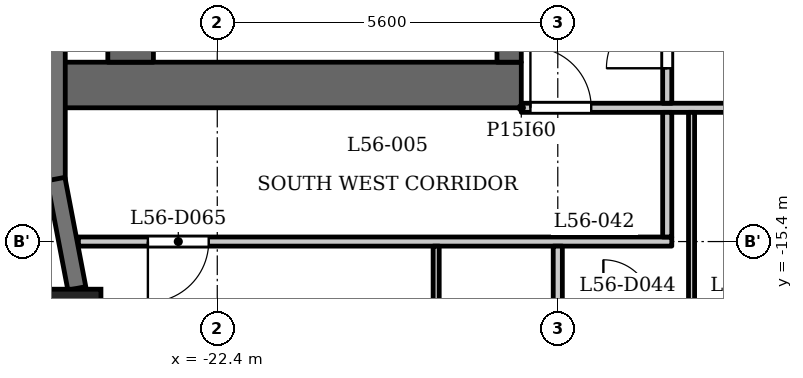
"""IFC4 building model, lengths in metres.
Left out: names, types, materials, properties, quantities, classifications, styles, units other than length and angle.
Written with IfcOpenShell. Run it as: python <this file> out.ifc"""

import sys

from ifc_helpers import new_model, si_unit, direction, frame, frame_2d, origin, origin_2d, place, context, subcontext, project, spatial, rectangle, extrude, element, fill, save


model = new_model("IFC4")
c1 = context("Model", 3, precision=1e-05, world=origin(), true_north=direction((0.0, 1.0)))
c2 = subcontext(c1, "Body", "Model", "MODEL_VIEW")
j1 = project(units=[si_unit("LENGTHUNIT", "METRE"), si_unit("PLANEANGLEUNIT", "RADIAN")], contexts=[c1])
p1 = place(None, origin())
s1 = spatial("IfcSite", under=j1, at=p1, CompositionType="ELEMENT")
p2 = place(p1, origin())
s2 = spatial("IfcBuilding", under=s1, at=p2, CompositionType="ELEMENT")
p3 = place(p2, frame((0.0, 0.0, 216.9)))
s3 = spatial("IfcBuildingStorey", under=s2, at=p3, CompositionType="ELEMENT", Elevation=216.9)
p4 = place(p3, frame((-24.738, -16.609, 0.0), z_axis=(0.0, 0.0, 1.0), x_axis=(1.0, 0.0, 0.0)))
e1 = element("IfcColumn", 1, at=p4, inside=s3, PredefinedType="COLUMN", context=c2, shape_type="SweptSolid", body=[
    extrude(rectangle(XDim=0.85, YDim=0.85, at=origin_2d()), origin(), (0.0, 0.0, 1.0), 3.5),
])
p5 = place(p3, frame((-25.05, -11.625, 0.0), z_axis=(0.0, 0.0, 1.0), x_axis=(0.0, -1.0, 0.0)))
e2 = element("IfcWall", 2, at=p5, inside=s3, PredefinedType="SOLIDWALL", context=c2, shape_type="SweptSolid", body=[
    extrude(rectangle(XDim=2.775, YDim=0.3, at=frame_2d((1.387, 0.0))), origin(), (0.0, 0.0, 1.0), 2.5),
])
p6 = place(p3, frame((-25.053, -14.372, 0.0), z_axis=(0.0, 0.0, 1.0), x_axis=(0.187442908742, -0.982275499014, 0.0)))
e3 = element("IfcWall", 3, at=p6, inside=s3, PredefinedType="SOLIDWALL", context=c2, shape_type="SweptSolid", body=[
    extrude(rectangle(XDim=1.831, YDim=0.3, at=frame_2d((0.916, 0.0))), origin(), (0.0, 0.0, 1.0), 2.5),
])
p7 = place(p3, frame((-17.4, -12.825, 0.0), z_axis=(0.0, 0.0, 1.0), x_axis=(-1.0, 0.0, 0.0)))
e4 = element("IfcWall", 4, at=p7, inside=s3, PredefinedType="SHEAR", context=c2, shape_type="SweptSolid", body=[
    extrude(rectangle(XDim=7.6, YDim=0.75, at=frame_2d((3.8, 0.0))), origin(), (0.0, 0.0, 1.0), 3.2),
])
p8 = place(p3, frame((-17.6, -12.45, 0.0), z_axis=(0.0, 0.0, 1.0), x_axis=(0.0, 1.0, 0.0)))
e5 = element("IfcWall", 5, at=p8, inside=s3, PredefinedType="SHEAR", context=c2, shape_type="SweptSolid", body=[
    extrude(rectangle(XDim=24.9, YDim=0.4, at=frame_2d((12.45, 0.0))), origin(), (0.0, 0.0, 1.0), 3.2),
])
p9 = place(p8, frame((6.85, 0.0, 0.0)))
e6 = element("IfcOpeningElement", 6, at=p9, cuts=e5, PredefinedType="OPENING", context=c2, shape_type="SweptSolid", body=[
    extrude(rectangle(XDim=0.9, YDim=2.1, at=frame_2d((0.45, 1.05))), frame((0.0, 0.21, 0.0), z_axis=(0.0, -1.0, 0.0), x_axis=(1.0, 0.0, 0.0)), (0.0, 0.0, 1.0), 0.42),
])
p10 = place(p8, frame((10.45, 0.0, 0.0)))
e7 = element("IfcOpeningElement", 7, at=p10, cuts=e5, PredefinedType="OPENING", context=c2, shape_type="SweptSolid", body=[
    extrude(rectangle(XDim=0.9, YDim=2.1, at=frame_2d((0.45, 1.05))), frame((0.0, 0.21, 0.0), z_axis=(0.0, -1.0, 0.0), x_axis=(1.0, 0.0, 0.0)), (0.0, 0.0, 1.0), 0.42),
])
p11 = place(p8, frame((15.6, 0.0, 0.0)))
e8 = element("IfcOpeningElement", 8, at=p11, cuts=e5, PredefinedType="OPENING", context=c2, shape_type="SweptSolid", body=[
    extrude(rectangle(XDim=1.1, YDim=2.1, at=frame_2d((0.55, 1.05))), frame((0.0, 0.21, 0.0), z_axis=(0.0, -1.0, 0.0), x_axis=(1.0, 0.0, 0.0)), (0.0, 0.0, 1.0), 0.42),
])
p12 = place(p8, frame((18.0, 0.0, 0.0)))
e9 = element("IfcOpeningElement", 9, at=p12, cuts=e5, PredefinedType="OPENING", context=c2, shape_type="SweptSolid", body=[
    extrude(rectangle(XDim=1.1, YDim=2.1, at=frame_2d((0.55, 1.05))), frame((0.0, 0.21, 0.0), z_axis=(0.0, -1.0, 0.0), x_axis=(1.0, 0.0, 0.0)), (0.0, 0.0, 1.0), 0.42),
])
p13 = place(p8, frame((23.025, 0.0, 0.0)))
e10 = element("IfcOpeningElement", 10, at=p13, cuts=e5, PredefinedType="OPENING", context=c2, shape_type="SweptSolid", body=[
    extrude(rectangle(XDim=1.1, YDim=2.1, at=frame_2d((0.55, 1.05))), frame((0.0, 0.21, 0.0), z_axis=(0.0, -1.0, 0.0), x_axis=(1.0, 0.0, 0.0)), (0.0, 0.0, 1.0), 0.42),
])
p14 = place(p8, frame((0.775, 0.0, 0.0)))
e11 = element("IfcOpeningElement", 11, at=p14, cuts=e5, PredefinedType="OPENING", context=c2, shape_type="SweptSolid", body=[
    extrude(rectangle(XDim=1.1, YDim=2.1, at=frame_2d((0.55, 1.05))), frame((0.0, 0.21, 0.0), z_axis=(0.0, -1.0, 0.0), x_axis=(1.0, 0.0, 0.0)), (0.0, 0.0, 1.0), 0.42),
])
p15 = place(p8, frame((12.925, 0.0, 0.0)))
e12 = element("IfcOpeningElement", 12, at=p15, cuts=e5, PredefinedType="OPENING", context=c2, shape_type="SweptSolid", body=[
    extrude(rectangle(XDim=1.8, YDim=2.1, at=frame_2d((0.9, 1.05))), frame((0.0, 0.21, 0.0), z_axis=(0.0, -1.0, 0.0), x_axis=(1.0, 0.0, 0.0)), (0.0, 0.0, 1.0), 0.42),
])
p16 = place(p3, frame((-23.825, -12.45, 0.0), z_axis=(0.0, 0.0, 1.0), x_axis=(0.0, 1.0, 0.0)))
e13 = element("IfcWall", 13, at=p16, inside=s3, PredefinedType="SHEAR", context=c2, shape_type="SweptSolid", body=[
    extrude(rectangle(XDim=24.9, YDim=0.75, at=frame_2d((12.45, 0.0))), origin(), (0.0, 0.0, 1.0), 3.2),
])
p17 = place(p3, frame((-24.684, -15.4, 0.0), z_axis=(0.0, 0.0, 1.0), x_axis=(1.0, 0.0, 0.0)))
e14 = element("IfcWall", 14, at=p17, inside=s3, PredefinedType="PARTITIONING", context=c2, shape_type="SweptSolid", body=[
    extrude(rectangle(XDim=9.759, YDim=0.15, at=frame_2d((4.879, 0.0))), origin(), (0.0, 0.0, 1.0), 3.2),
])
p18 = place(p17, frame((1.143, 0.0, 0.0)))
e15 = element("IfcOpeningElement", 15, at=p18, cuts=e14, PredefinedType="OPENING", context=c2, shape_type="SweptSolid", body=[
    extrude(rectangle(XDim=1.0, YDim=2.1, at=frame_2d((0.5, 1.05))), frame((0.0, 0.085, 0.0), z_axis=(0.0, -1.0, 0.0), x_axis=(1.0, 0.0, 0.0)), (0.0, 0.0, 1.0), 0.17),
])
p19 = place(p3, frame((-17.4, -13.2, 0.0), z_axis=(0.0, 0.0, 1.0), x_axis=(1.0, 0.0, 0.0)))
e16 = element("IfcWall", 16, at=p19, inside=s3, PredefinedType="PARTITIONING", context=c2, shape_type="SweptSolid", body=[
    extrude(rectangle(XDim=34.8, YDim=0.15, at=frame_2d((17.4, 0.0))), origin(), (0.0, 0.0, 1.0), 3.2),
])
p20 = place(p19, frame((0.15, 0.0, 0.0)))
e17 = element("IfcOpeningElement", 17, at=p20, cuts=e16, PredefinedType="OPENING", context=c2, shape_type="SweptSolid", body=[
    extrude(rectangle(XDim=1.0, YDim=2.1, at=frame_2d((0.5, 1.05))), frame((0.0, 0.085, 0.0), z_axis=(0.0, -1.0, 0.0), x_axis=(1.0, 0.0, 0.0)), (0.0, 0.0, 1.0), 0.17),
])
p21 = place(p19, frame((33.55, 0.0, 0.0)))
e18 = element("IfcOpeningElement", 18, at=p21, cuts=e16, PredefinedType="OPENING", context=c2, shape_type="SweptSolid", body=[
    extrude(rectangle(XDim=1.0, YDim=2.1, at=frame_2d((0.5, 1.05))), frame((0.0, 0.085, 0.0), z_axis=(0.0, -1.0, 0.0), x_axis=(1.0, 0.0, 0.0)), (0.0, 0.0, 1.0), 0.17),
])
p22 = place(p19, frame((3.7, 0.0, 0.0)))
e19 = element("IfcOpeningElement", 19, at=p22, cuts=e16, PredefinedType="OPENING", context=c2, shape_type="SweptSolid", body=[
    extrude(rectangle(XDim=1.0, YDim=2.1, at=frame_2d((0.5, 1.05))), frame((0.0, 0.085, 0.0), z_axis=(0.0, -1.0, 0.0), x_axis=(1.0, 0.0, 0.0)), (0.0, 0.0, 1.0), 0.17),
])
p23 = place(p19, frame((15.7, 0.0, 0.0)))
e20 = element("IfcOpeningElement", 20, at=p23, cuts=e16, PredefinedType="OPENING", context=c2, shape_type="SweptSolid", body=[
    extrude(rectangle(XDim=1.0, YDim=2.1, at=frame_2d((0.5, 1.05))), frame((0.0, 0.085, 0.0), z_axis=(0.0, -1.0, 0.0), x_axis=(1.0, 0.0, 0.0)), (0.0, 0.0, 1.0), 0.17),
])
p24 = place(p19, frame((21.3, 0.0, 0.0)))
e21 = element("IfcOpeningElement", 21, at=p24, cuts=e16, PredefinedType="OPENING", context=c2, shape_type="SweptSolid", body=[
    extrude(rectangle(XDim=1.0, YDim=2.1, at=frame_2d((0.5, 1.05))), frame((0.0, 0.085, 0.0), z_axis=(0.0, -1.0, 0.0), x_axis=(1.0, 0.0, 0.0)), (0.0, 0.0, 1.0), 0.17),
])
p25 = place(p19, frame((29.5, 0.0, 0.0)))
e22 = element("IfcOpeningElement", 22, at=p25, cuts=e16, PredefinedType="OPENING", context=c2, shape_type="SweptSolid", body=[
    extrude(rectangle(XDim=1.0, YDim=2.1, at=frame_2d((0.5, 1.05))), frame((0.0, 0.085, 0.0), z_axis=(0.0, -1.0, 0.0), x_axis=(1.0, 0.0, 0.0)), (0.0, 0.0, 1.0), 0.17),
])
p26 = place(p3, frame((-18.8, -18.65, 0.0), z_axis=(0.0, 0.0, 1.0), x_axis=(0.0, 1.0, 0.0)))
e23 = element("IfcWall", 23, at=p26, inside=s3, PredefinedType="PARTITIONING", context=c2, shape_type="SweptSolid", body=[
    extrude(rectangle(XDim=3.175, YDim=0.1, at=frame_2d((1.587, 0.0))), origin(), (0.0, 0.0, 1.0), 3.2),
])
p27 = place(p3, frame((-16.8, -22.31, 0.0), z_axis=(0.0, 0.0, 1.0), x_axis=(0.0, 1.0, 0.0)))
e24 = element("IfcWall", 24, at=p27, inside=s3, PredefinedType="PARTITIONING", context=c2, shape_type="SweptSolid", body=[
    extrude(rectangle(XDim=6.835, YDim=0.15, at=frame_2d((3.417, 0.0))), origin(), (0.0, 0.0, 1.0), 2.55),
])
p28 = place(p3, frame((-15.0, -15.325, 0.0), z_axis=(0.0, 0.0, 1.0), x_axis=(0.0, 1.0, 0.0)))
e25 = element("IfcWall", 25, at=p28, inside=s3, PredefinedType="PARTITIONING", context=c2, shape_type="SweptSolid", body=[
    extrude(rectangle(XDim=2.05, YDim=0.15, at=frame_2d((1.025, 0.0))), origin(), (0.0, 0.0, 1.0), 3.2),
])
p29 = place(p3, frame((-15.0, -13.125, 0.0), z_axis=(0.0, 0.0, 1.0), x_axis=(0.0, 1.0, 0.0)))
e26 = element("IfcWall", 26, at=p29, inside=s3, PredefinedType="PARTITIONING", context=c2, shape_type="SweptSolid", body=[
    extrude(rectangle(XDim=6.356, YDim=0.15, at=frame_2d((3.178, 0.0))), origin(), (0.0, 0.0, 1.0), 3.2),
])
p30 = place(p29, frame((0.575, 0.0, 0.0)))
e27 = element("IfcOpeningElement", 27, at=p30, cuts=e26, PredefinedType="OPENING", context=c2, shape_type="SweptSolid", body=[
    extrude(rectangle(XDim=1.0, YDim=2.1, at=frame_2d((0.5, 1.05))), frame((0.0, 0.085, 0.0), z_axis=(0.0, -1.0, 0.0), x_axis=(1.0, 0.0, 0.0)), (0.0, 0.0, 1.0), 0.17),
])
p31 = place(p3, frame((-14.6, -16.45, 0.0), z_axis=(0.0, 0.0, 1.0), x_axis=(0.0, 1.0, 0.0)))
e28 = element("IfcWall", 28, at=p31, inside=s3, PredefinedType="PARTITIONING", context=c2, shape_type="SweptSolid", body=[
    extrude(rectangle(XDim=3.175, YDim=0.1, at=frame_2d((1.587, 0.0))), origin(), (0.0, 0.0, 1.0), 3.2),
])
p32 = place(p30, origin())
e29 = element("IfcDoor", 29, at=p32, inside=s3, OperationType="SINGLE_SWING_RIGHT", PredefinedType="DOOR", context=c2, shape_type="SweptSolid", body=[
    extrude(rectangle(XDim=1.0, YDim=2.1, at=frame_2d((0.5, 1.05))), frame((0.0, 0.025, 0.0), z_axis=(0.0, -1.0, 0.0), x_axis=(1.0, 0.0, 0.0)), (0.0, 0.0, 1.0), 0.05),
])
fill(e27, e29)
p33 = place(p20, origin())
e30 = element("IfcDoor", 30, at=p33, inside=s3, OperationType="SINGLE_SWING_RIGHT", PredefinedType="DOOR", context=c2, shape_type="SweptSolid", body=[
    extrude(rectangle(XDim=1.0, YDim=2.1, at=frame_2d((0.5, 1.05))), frame((0.0, 0.025, 0.0), z_axis=(0.0, -1.0, 0.0), x_axis=(1.0, 0.0, 0.0)), (0.0, 0.0, 1.0), 0.05),
])
fill(e17, e30)
p34 = place(p18, origin())
e31 = element("IfcDoor", 31, at=p34, inside=s3, OperationType="SINGLE_SWING_LEFT", PredefinedType="DOOR", context=c2, shape_type="SweptSolid", body=[
    extrude(rectangle(XDim=1.0, YDim=2.1, at=frame_2d((0.5, 1.05))), frame((0.0, 0.025, 0.0), z_axis=(0.0, -1.0, 0.0), x_axis=(1.0, 0.0, 0.0)), (0.0, 0.0, 1.0), 0.05),
])
fill(e15, e31)
save(model, sys.argv[1])
